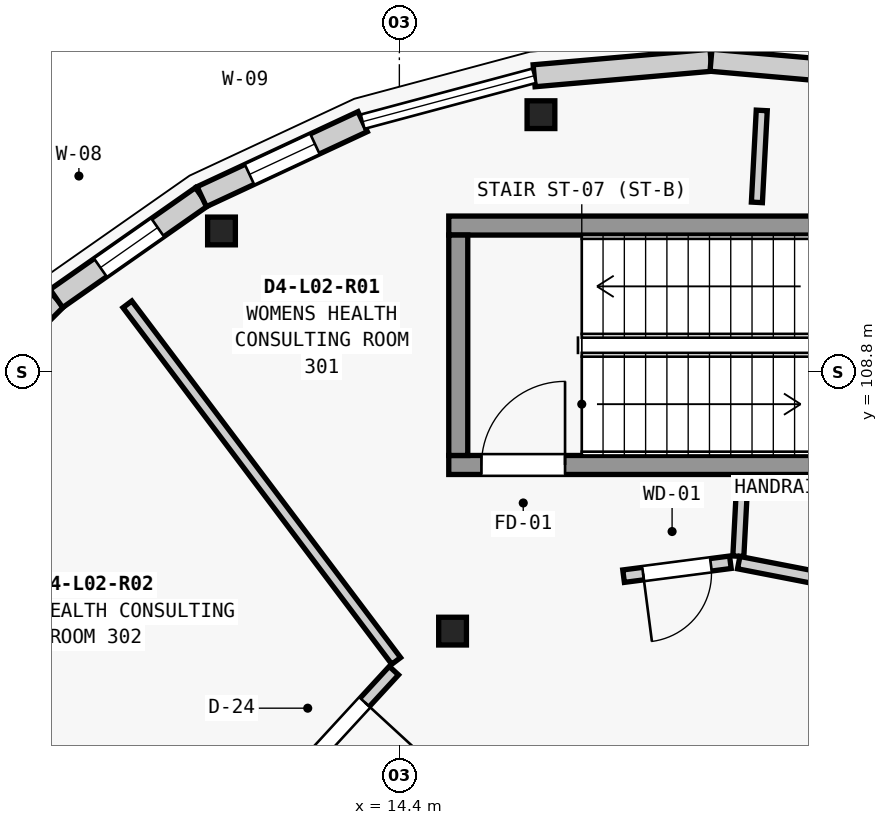
"""IFC4 building model, lengths in metres.
Left out: names, types, materials, properties, quantities, classifications, styles, units other than length and angle.
Written with IfcOpenShell. Run it as: python <this file> out.ifc"""

import sys

from ifc_helpers import new_model, si_unit, direction, frame, frame_2d, origin, origin_2d, place, context, subcontext, project, spatial, rectangle, extrude, element, fill, save


model = new_model("IFC4")
c1 = context("Model", 3, precision=1e-05, world=origin(), true_north=direction((0.0, 1.0)))
c2 = subcontext(c1, "Body", "Model", "MODEL_VIEW")
j1 = project(units=[si_unit("LENGTHUNIT", "METRE"), si_unit("PLANEANGLEUNIT", "RADIAN")], contexts=[c1])
p1 = place(None, origin())
s1 = spatial("IfcSite", under=j1, at=p1, CompositionType="ELEMENT")
p2 = place(p1, origin())
s2 = spatial("IfcBuilding", under=s1, at=p2, CompositionType="ELEMENT")
p3 = place(p2, frame((0.0, 0.0, 8.75)))
s3 = spatial("IfcBuildingStorey", under=s2, at=p3, CompositionType="ELEMENT", Elevation=8.75)
for number, where, z_axis, x_axis in (
    (1, (16.263, 112.184, 0.0), (0.0, 0.0, 1.0), (1.0, 0.0, 0.0)),
    (2, (12.06, 110.654, 0.0), (0.0, 0.0, 1.0), (1.0, 0.0, 0.0)),
    (3, (15.1, 105.389, 0.0), (0.0, 0.0, 1.0), (1.0, 0.0, 0.0)),
):
    element("IfcColumn", number, at=place(p3, frame(where, z_axis=z_axis, x_axis=x_axis)), inside=s3, PredefinedType="COLUMN", context=c2, shape_type="SweptSolid", body=[
        extrude(rectangle(XDim=0.365, YDim=0.365, at=origin_2d()), origin(), (0.0, 0.0, 1.0), 4.2),
    ])
p4 = place(p3, frame((8.235, 108.113, 0.0), z_axis=(0.0, 0.0, 1.0), x_axis=(0.707106781187, 0.707106781187, 0.0)))
e4 = element("IfcWall", 4, at=p4, inside=s3, PredefinedType="ELEMENTEDWALL", context=c2, shape_type="SweptSolid", body=[
    extrude(rectangle(XDim=2.336, YDim=0.29, at=frame_2d((1.168, 0.0))), origin(), (0.0, 0.0, 1.0), 3.329),
])
p5 = place(p4, frame((0.718, 0.0, 0.85)))
e5 = element("IfcOpeningElement", 5, at=p5, cuts=e4, PredefinedType="OPENING", context=c2, shape_type="SweptSolid", body=[
    extrude(rectangle(XDim=0.9, YDim=1.9, at=frame_2d((0.45, 0.95))), frame((0.0, 0.155, 0.0), z_axis=(0.0, -1.0, 0.0), x_axis=(1.0, 0.0, 0.0)), (0.0, 0.0, 1.0), 0.31),
])
p6 = place(p3, frame((9.887, 109.765, 0.0), z_axis=(0.0, 0.0, 1.0), x_axis=(0.819045278347, 0.573728883722, 0.0)))
e6 = element("IfcWall", 6, at=p6, inside=s3, PredefinedType="ELEMENTEDWALL", context=c2, shape_type="SweptSolid", body=[
    extrude(rectangle(XDim=2.336, YDim=0.29, at=frame_2d((1.168, 0.0))), origin(), (0.0, 0.0, 1.0), 3.329),
])
p7 = place(p6, frame((0.708, 0.0, 0.85)))
e7 = element("IfcOpeningElement", 7, at=p7, cuts=e6, PredefinedType="OPENING", context=c2, shape_type="SweptSolid", body=[
    extrude(rectangle(XDim=0.92, YDim=1.55, at=frame_2d((0.46, 0.775))), frame((0.0, 0.155, 0.0), z_axis=(0.0, -1.0, 0.0), x_axis=(1.0, 0.0, 0.0)), (0.0, 0.0, 1.0), 0.31),
])
p8 = place(p3, frame((11.8, 111.105, 0.0), z_axis=(0.0, 0.0, 1.0), x_axis=(0.906321946979, 0.422587894318, 0.0)))
e8 = element("IfcWall", 8, at=p8, inside=s3, PredefinedType="ELEMENTEDWALL", context=c2, shape_type="SweptSolid", body=[
    extrude(rectangle(XDim=2.336, YDim=0.29, at=frame_2d((1.168, 0.0))), origin(), (0.0, 0.0, 1.0), 3.329),
])
p9 = place(p8, frame((0.693, 0.0, 0.85)))
e9 = element("IfcOpeningElement", 9, at=p9, cuts=e8, PredefinedType="OPENING", context=c2, shape_type="SweptSolid", body=[
    extrude(rectangle(XDim=0.95, YDim=1.35, at=frame_2d((0.475, 0.675))), frame((0.0, 0.155, 0.0), z_axis=(0.0, -1.0, 0.0), x_axis=(1.0, 0.0, 0.0)), (0.0, 0.0, 1.0), 0.31),
])
for number, where, z_axis, x_axis in (
    (10, (16.173, 112.696, 0.0), (0.0, 0.0, 1.0), (0.996, 0.087, 0.0)),
    (11, (18.5, 112.9, 0.0), (0.0, 0.0, 1.0), (0.996, -0.087, 0.0)),
):
    element("IfcWall", number, at=place(p3, frame(where, z_axis=z_axis, x_axis=x_axis)), inside=s3, PredefinedType="ELEMENTEDWALL", context=c2, shape_type="SweptSolid", body=[
        extrude(rectangle(XDim=2.336, YDim=0.29, at=frame_2d((1.168, 0.0))), origin(), (0.0, 0.0, 1.0), 3.329),
    ])
p10 = place(p3, frame((15.05, 107.575, 0.0), z_axis=(0.0, 0.0, 1.0), x_axis=(1.0, 0.0, 0.0)))
e12 = element("IfcWall", 12, at=p10, inside=s3, PredefinedType="SHEAR", context=c2, shape_type="SweptSolid", body=[
    extrude(rectangle(XDim=6.9, YDim=0.25, at=frame_2d((3.45, 0.0))), origin(), (0.0, 0.0, 1.0), 3.975),
])
p11 = place(p10, frame((0.43, 0.0, 0.0)))
e13 = element("IfcOpeningElement", 13, at=p11, cuts=e12, PredefinedType="OPENING", context=c2, shape_type="SweptSolid", body=[
    extrude(rectangle(XDim=1.1, YDim=2.15, at=frame_2d((0.55, 1.075))), frame((0.0, 0.135, 0.0), z_axis=(0.0, -1.0, 0.0), x_axis=(1.0, 0.0, 0.0)), (0.0, 0.0, 1.0), 0.27),
])
p12 = place(p3, frame((15.05, 110.725, 0.0), z_axis=(0.0, 0.0, 1.0), x_axis=(1.0, 0.0, 0.0)))
e14 = element("IfcWall", 14, at=p12, inside=s3, PredefinedType="SHEAR", context=c2, shape_type="SweptSolid", body=[
    extrude(rectangle(XDim=6.9, YDim=0.25, at=frame_2d((3.45, 0.0))), origin(), (0.0, 0.0, 1.0), 3.975),
])
p13 = place(p3, frame((15.175, 107.7, 0.0), z_axis=(0.0, 0.0, 1.0), x_axis=(0.0, 1.0, 0.0)))
e15 = element("IfcWall", 15, at=p13, inside=s3, PredefinedType="SHEAR", context=c2, shape_type="SweptSolid", body=[
    extrude(rectangle(XDim=2.9, YDim=0.25, at=frame_2d((1.45, 0.0))), origin(), (0.0, 0.0, 1.0), 3.975),
])
p14 = place(p3, frame((18.86, 106.374, 0.0), z_axis=(0.0, 0.0, 1.0), x_axis=(0.052244629109, 0.998634316819, 0.0)))
e16 = element("IfcWall", 16, at=p14, inside=s3, PredefinedType="PARTITIONING", context=c2, shape_type="SweptSolid", body=[
    extrude(rectangle(XDim=0.897, YDim=0.145, at=frame_2d((0.449, 0.0))), origin(), (0.0, 0.0, 1.0), 3.304),
])
p15 = place(p3, frame((19.104, 111.03, 0.0), z_axis=(0.0, 0.0, 1.0), x_axis=(0.05279149634, 0.998605556721, 0.0)))
e17 = element("IfcWall", 17, at=p15, inside=s3, PredefinedType="PARTITIONING", context=c2, shape_type="SweptSolid", body=[
    extrude(rectangle(XDim=1.212, YDim=0.145, at=frame_2d((0.606, 0.0))), origin(), (0.0, 0.0, 1.0), 3.304),
])
p16 = place(p3, frame((14.358, 104.997, 0.0), z_axis=(0.0, 0.0, 1.0), x_axis=(-0.601846782462, 0.798611576701, 0.0)))
e18 = element("IfcWall", 18, at=p16, inside=s3, PredefinedType="PARTITIONING", context=c2, shape_type="SweptSolid", body=[
    extrude(rectangle(XDim=5.875, YDim=0.145, at=frame_2d((2.938, 0.0))), origin(), (0.0, 0.0, 1.0), 3.304),
])
p17 = place(p3, frame((18.755, 106.295, 0.0), z_axis=(0.0, 0.0, 1.0), x_axis=(-0.991634012436, -0.129081313054, 0.0)))
e19 = element("IfcWall", 19, at=p17, inside=s3, PredefinedType="PARTITIONING", context=c2, shape_type="SweptSolid", body=[
    extrude(rectangle(XDim=1.417, YDim=0.165, at=frame_2d((0.708, 0.0))), origin(), (0.0, 0.0, 1.0), 3.304),
])
p18 = place(p17, frame((0.258, 0.0, 0.0)))
e20 = element("IfcOpeningElement", 20, at=p18, cuts=e19, PredefinedType="OPENING", context=c2, shape_type="SweptSolid", body=[
    extrude(rectangle(XDim=0.9, YDim=2.1, at=frame_2d((0.45, 1.05))), frame((0.0, 0.093, 0.0), z_axis=(0.0, -1.0, 0.0), x_axis=(1.0, 0.0, 0.0)), (0.0, 0.0, 1.0), 0.185),
])
p19 = place(p3, frame((14.328, 104.869, 0.0), z_axis=(0.0, 0.0, 1.0), x_axis=(-0.676853044356, -0.736118167379, 0.0)))
e21 = element("IfcWall", 21, at=p19, inside=s3, PredefinedType="PARTITIONING", context=c2, shape_type="SweptSolid", body=[
    extrude(rectangle(XDim=2.261, YDim=0.165, at=frame_2d((1.131, 0.0))), origin(), (0.0, 0.0, 1.0), 3.304),
])
p20 = place(p19, frame((0.566, 0.0, 0.0)))
e22 = element("IfcOpeningElement", 22, at=p20, cuts=e21, PredefinedType="OPENING", context=c2, shape_type="SweptSolid", body=[
    extrude(rectangle(XDim=1.13, YDim=2.14, at=frame_2d((0.565, 1.07))), frame((0.0, 0.093, 0.0), z_axis=(0.0, -1.0, 0.0), x_axis=(1.0, 0.0, 0.0)), (0.0, 0.0, 1.0), 0.185),
])
p21 = place(p3, frame((20.714, 105.93, 0.0), z_axis=(0.0, 0.0, 1.0), x_axis=(-0.981560041322, 0.191154087794, 0.0)))
e23 = element("IfcWall", 23, at=p21, inside=s3, PredefinedType="PARTITIONING", context=c2, shape_type="SweptSolid", body=[
    extrude(rectangle(XDim=1.884, YDim=0.165, at=frame_2d((0.942, 0.0))), origin(), (0.0, 0.0, 1.0), 3.304),
])
p22 = place(p7, origin())
e24 = element("IfcWindow", 24, at=p22, inside=s3, PartitioningType="SINGLE_PANEL", PredefinedType="WINDOW", context=c2, shape_type="SweptSolid", body=[
    extrude(rectangle(XDim=0.92, YDim=1.55, at=frame_2d((0.46, 0.775))), frame((0.0, 0.03, 0.0), z_axis=(0.0, -1.0, 0.0), x_axis=(1.0, 0.0, 0.0)), (0.0, 0.0, 1.0), 0.06),
])
fill(e7, e24)
p23 = place(p9, origin())
e25 = element("IfcWindow", 25, at=p23, inside=s3, PartitioningType="SINGLE_PANEL", PredefinedType="WINDOW", context=c2, shape_type="SweptSolid", body=[
    extrude(rectangle(XDim=0.95, YDim=1.35, at=frame_2d((0.475, 0.675))), frame((0.0, 0.03, 0.0), z_axis=(0.0, -1.0, 0.0), x_axis=(1.0, 0.0, 0.0)), (0.0, 0.0, 1.0), 0.06),
])
fill(e9, e25)
p24 = place(p11, origin())
e26 = element("IfcDoor", 26, at=p24, inside=s3, OperationType="SINGLE_SWING_RIGHT", PredefinedType="DOOR", context=c2, shape_type="SweptSolid", body=[
    extrude(rectangle(XDim=1.1, YDim=2.15, at=frame_2d((0.55, 1.075))), frame((0.0, 0.025, 0.0), z_axis=(0.0, -1.0, 0.0), x_axis=(1.0, 0.0, 0.0)), (0.0, 0.0, 1.0), 0.05),
])
fill(e13, e26)
p25 = place(p18, origin())
e27 = element("IfcDoor", 27, at=p25, inside=s3, OperationType="SINGLE_SWING_RIGHT", PredefinedType="DOOR", context=c2, shape_type="SweptSolid", body=[
    extrude(rectangle(XDim=0.9, YDim=2.1, at=frame_2d((0.45, 1.05))), frame((0.0, 0.025, 0.0), z_axis=(0.0, -1.0, 0.0), x_axis=(1.0, 0.0, 0.0)), (0.0, 0.0, 1.0), 0.05),
])
fill(e20, e27)
p26 = place(p20, origin())
e28 = element("IfcDoor", 28, at=p26, inside=s3, OperationType="SINGLE_SWING_LEFT", PredefinedType="DOOR", context=c2, shape_type="SweptSolid", body=[
    extrude(rectangle(XDim=1.13, YDim=2.14, at=frame_2d((0.565, 1.07))), frame((0.0, 0.025, 0.0), z_axis=(0.0, -1.0, 0.0), x_axis=(1.0, 0.0, 0.0)), (0.0, 0.0, 1.0), 0.05),
])
fill(e22, e28)
save(model, sys.argv[1])
